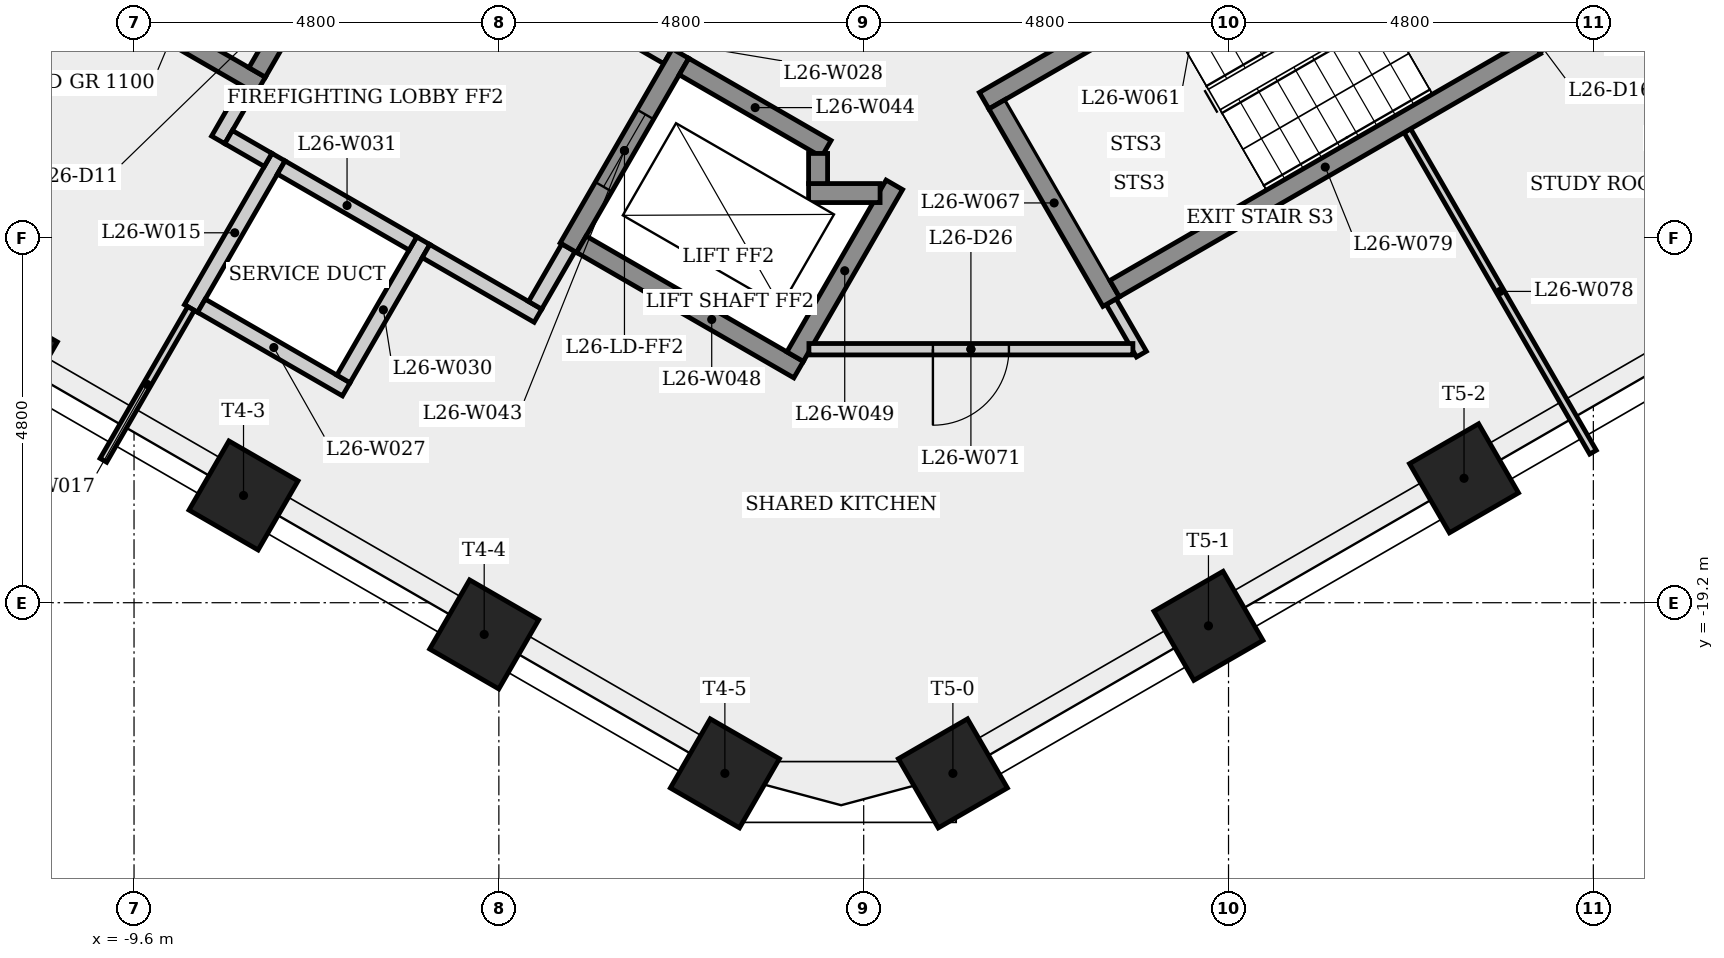
"""IFC4 building model, lengths in metres.
Left out: names, types, materials, properties, quantities, classifications, styles, units other than length and angle.
Written with IfcOpenShell. Run it as: python <this file> out.ifc"""

import sys

from ifc_helpers import new_model, si_unit, direction, frame, frame_2d, origin, origin_2d, place, context, subcontext, project, spatial, rectangle, extrude, element, fill, save


model = new_model("IFC4")
c1 = context("Model", 3, precision=1e-05, world=origin(), true_north=direction((0.0, 1.0)))
c2 = subcontext(c1, "Body", "Model", "MODEL_VIEW")
j1 = project(units=[si_unit("LENGTHUNIT", "METRE"), si_unit("PLANEANGLEUNIT", "RADIAN")], contexts=[c1])
p1 = place(None, origin())
s1 = spatial("IfcSite", under=j1, at=p1, CompositionType="ELEMENT")
p2 = place(p1, origin())
s2 = spatial("IfcBuilding", under=s1, at=p2, CompositionType="ELEMENT")
p3 = place(p2, frame((0.0, 0.0, 100.1)))
s3 = spatial("IfcBuildingStorey", under=s2, at=p3, CompositionType="ELEMENT", Elevation=100.1)
for number, where, z_axis, x_axis in (
    (1, (-11.326, -15.961, 0.0), (0.0, 0.0, 1.0), (-0.5, -0.866, 0.0)),
    (2, (-8.159, -17.789, 0.0), (0.0, 0.0, 1.0), (-0.5, -0.866, 0.0)),
    (3, (-4.993, -19.617, 0.0), (0.0, 0.0, 1.0), (-0.5, -0.866, 0.0)),
    (4, (-1.826, -21.446, 0.0), (0.0, 0.0, 1.0), (-0.5, -0.866, 0.0)),
    (5, (1.174, -21.446, 0.0), (0.0, 0.0, 1.0), (0.5, -0.866, 0.0)),
    (6, (4.536, -19.504, 0.0), (0.0, 0.0, 1.0), (0.5, -0.866, 0.0)),
    (7, (7.898, -17.563, 0.0), (0.0, 0.0, 1.0), (0.5, -0.866, 0.0)),
):
    element("IfcColumn", number, at=place(p3, frame(where, z_axis=z_axis, x_axis=x_axis)), inside=s3, PredefinedType="COLUMN", context=c2, shape_type="SweptSolid", body=[
        extrude(rectangle(XDim=1.05, YDim=1.05, at=origin_2d()), origin(), (0.0, 0.0, 1.0), 3.4),
    ])
p4 = place(p3, frame((-8.85, -15.329, 0.0), z_axis=(0.0, 0.0, 1.0), x_axis=(0.500077740698, 0.865980515519, 0.0)))
e8 = element("IfcWall", 8, at=p4, inside=s3, PredefinedType="PLUMBINGWALL", context=c2, shape_type="SweptSolid", body=[
    extrude(rectangle(XDim=2.3, YDim=0.2, at=frame_2d((1.15, 0.0))), origin(), (0.0, 0.0, 1.0), 3.05),
])
p5 = place(p3, frame((-8.85, -15.329, 0.0), z_axis=(0.0, 0.0, 1.0), x_axis=(-0.500009533716, -0.866019899421, 0.0)))
e9 = element("IfcWall", 9, at=p5, inside=s3, PredefinedType="PARTITIONING", context=c2, shape_type="SweptSolid", body=[
    extrude(rectangle(XDim=2.307, YDim=0.1, at=frame_2d((1.153, 0.0))), origin(), (0.0, 0.0, 1.0), 3.05),
])
p6 = place(p3, frame((-8.493, -13.11, 0.0), z_axis=(0.0, 0.0, 1.0), x_axis=(0.500067724834, 0.865986299303, 0.0)))
e10 = element("IfcWall", 10, at=p6, inside=s3, PredefinedType="PARTITIONING", context=c2, shape_type="SweptSolid", body=[
    extrude(rectangle(XDim=0.775, YDim=0.2, at=frame_2d((0.388, 0.0))), origin(), (0.0, 0.0, 1.0), 3.05),
])
p7 = place(p3, frame((-7.935, -12.393, 0.0), z_axis=(0.0, 0.0, 1.0), x_axis=(-0.866025499775, 0.499999833739, 0.0)))
e11 = element("IfcWall", 11, at=p7, inside=s3, PredefinedType="SHEAR", context=c2, shape_type="SweptSolid", body=[
    extrude(rectangle(XDim=6.4, YDim=0.25, at=frame_2d((3.2, 0.0))), origin(), (0.0, 0.0, 1.0), 3.05),
])
p8 = place(p3, frame((-7.836, -13.373, 0.0), z_axis=(0.0, 0.0, 1.0), x_axis=(-0.866232998003, 0.499640263761, 0.0)))
e12 = element("IfcWall", 12, at=p8, inside=s3, PredefinedType="PARTITIONING", context=c2, shape_type="SweptSolid", body=[
    extrude(rectangle(XDim=0.6, YDim=0.2, at=frame_2d((0.3, 0.0))), origin(), (0.0, 0.0, 1.0), 3.05),
])
p9 = place(p3, frame((-6.808, -16.392, 0.0), z_axis=(0.0, 0.0, 1.0), x_axis=(-0.866008176907, 0.50002983664, 0.0)))
e13 = element("IfcWall", 13, at=p9, inside=s3, PredefinedType="PLUMBINGWALL", context=c2, shape_type="SweptSolid", body=[
    extrude(rectangle(XDim=2.2, YDim=0.2, at=frame_2d((1.1, 0.0))), origin(), (0.0, 0.0, 1.0), 3.05),
])
p10 = place(p3, frame((-6.605, -9.841, 0.0), z_axis=(0.0, 0.0, 1.0), x_axis=(-0.499996545922, -0.866027397988, 0.0)))
e14 = element("IfcWall", 14, at=p10, inside=s3, PredefinedType="SHEAR", context=c2, shape_type="SweptSolid", body=[
    extrude(rectangle(XDim=2.75, YDim=0.25, at=frame_2d((1.375, 0.0))), origin(), (0.0, 0.0, 1.0), 3.05),
])
p11 = place(p10, frame((0.875, 0.0, 0.0)))
e15 = element("IfcOpeningElement", 15, at=p11, cuts=e14, PredefinedType="OPENING", context=c2, shape_type="SweptSolid", body=[
    extrude(rectangle(XDim=1.0, YDim=2.1, at=frame_2d((0.5, 1.05))), frame((0.0, 0.135, 0.0), z_axis=(0.0, -1.0, 0.0), x_axis=(1.0, 0.0, 0.0)), (0.0, 0.0, 1.0), 0.27),
])
p12 = place(p3, frame((-6.435, -9.795, 0.0), z_axis=(0.0, 0.0, 1.0), x_axis=(0.866012907634, -0.500021643343, 0.0)))
e16 = element("IfcWall", 16, at=p12, inside=s3, PredefinedType="PARTITIONING", context=c2, shape_type="SweptSolid", body=[
    extrude(rectangle(XDim=4.45, YDim=0.2, at=frame_2d((2.225, 0.0))), origin(), (0.0, 0.0, 1.0), 3.05),
])
p13 = place(p12, frame((1.675, 0.0, 0.0)))
e17 = element("IfcOpeningElement", 17, at=p13, cuts=e16, PredefinedType="OPENING", context=c2, shape_type="SweptSolid", body=[
    extrude(rectangle(XDim=1.1, YDim=2.1, at=frame_2d((0.55, 1.05))), frame((0.0, 0.11, 0.0), z_axis=(0.0, -1.0, 0.0), x_axis=(1.0, 0.0, 0.0)), (0.0, 0.0, 1.0), 0.22),
])
p14 = place(p3, frame((-5.795, -14.437, 0.0), z_axis=(0.0, 0.0, 1.0), x_axis=(-0.500027713859, -0.866009402589, 0.0)))
e18 = element("IfcWall", 18, at=p14, inside=s3, PredefinedType="PLUMBINGWALL", context=c2, shape_type="SweptSolid", body=[
    extrude(rectangle(XDim=2.1, YDim=0.2, at=frame_2d((1.05, 0.0))), origin(), (0.0, 0.0, 1.0), 3.05),
])
p15 = place(p3, frame((-5.931, -14.473, 0.0), z_axis=(0.0, 0.0, 1.0), x_axis=(-0.866041268327, 0.499972520799, 0.0)))
e19 = element("IfcWall", 19, at=p15, inside=s3, PredefinedType="PLUMBINGWALL", context=c2, shape_type="SweptSolid", body=[
    extrude(rectangle(XDim=2.0, YDim=0.2, at=frame_2d((1.0, 0.0))), origin(), (0.0, 0.0, 1.0), 3.05),
])
p16 = place(p3, frame((-4.286, -15.423, 0.0), z_axis=(0.0, 0.0, 1.0), x_axis=(-0.866025371046, 0.500000056704, 0.0)))
e20 = element("IfcWall", 20, at=p16, inside=s3, PredefinedType="PARTITIONING", context=c2, shape_type="SweptSolid", body=[
    extrude(rectangle(XDim=1.7, YDim=0.2, at=frame_2d((0.85, 0.0))), origin(), (0.0, 0.0, 1.0), 3.05),
])
p17 = place(p3, frame((-3.885, -14.529, 0.0), z_axis=(0.0, 0.0, 1.0), x_axis=(-0.499859285417, -0.866106630146, 0.0)))
e21 = element("IfcWall", 21, at=p17, inside=s3, PredefinedType="PARTITIONING", context=c2, shape_type="SweptSolid", body=[
    extrude(rectangle(XDim=0.875, YDim=0.2, at=frame_2d((0.438, 0.0))), origin(), (0.0, 0.0, 1.0), 3.05),
])
p18 = place(p3, frame((-2.41, -11.974, 0.0), z_axis=(0.0, 0.0, 1.0), x_axis=(-0.500001826776, -0.866024349092, 0.0)))
e22 = element("IfcWall", 22, at=p18, inside=s3, PredefinedType="SHEAR", context=c2, shape_type="SweptSolid", body=[
    extrude(rectangle(XDim=2.95, YDim=0.25, at=frame_2d((1.475, 0.0))), origin(), (0.0, 0.0, 1.0), 3.05),
])
p19 = place(p18, frame((0.925, 0.0, 0.0)))
e23 = element("IfcOpeningElement", 23, at=p19, cuts=e22, PredefinedType="OPENING", context=c2, shape_type="SweptSolid", body=[
    extrude(rectangle(XDim=1.1, YDim=2.1, at=frame_2d((0.55, 1.05))), frame((0.0, 0.135, 0.0), z_axis=(0.0, -1.0, 0.0), x_axis=(1.0, 0.0, 0.0)), (0.0, 0.0, 1.0), 0.27),
])
p20 = place(p3, frame((-2.364, -12.145, 0.0), z_axis=(0.0, 0.0, 1.0), x_axis=(0.86603892542, -0.499976579108, 0.0)))
e24 = element("IfcWall", 24, at=p20, inside=s3, PredefinedType="SHEAR", context=c2, shape_type="SweptSolid", body=[
    extrude(rectangle(XDim=2.162, YDim=0.25, at=frame_2d((1.081, 0.0))), origin(), (0.0, 0.0, 1.0), 3.05),
])
p21 = place(p3, frame((-0.856, -16.133, 0.0), z_axis=(0.0, 0.0, 1.0), x_axis=(-0.866021716278, 0.500006386895, 0.0)))
e25 = element("IfcWall", 25, at=p21, inside=s3, PredefinedType="SHEAR", context=c2, shape_type="SweptSolid", body=[
    extrude(rectangle(XDim=3.3, YDim=0.25, at=frame_2d((1.65, 0.0))), origin(), (0.0, 0.0, 1.0), 3.05),
])
p22 = place(p3, frame((-0.902, -15.962, 0.0), z_axis=(0.0, 0.0, 1.0), x_axis=(0.499981517636, 0.866036074319, 0.0)))
e26 = element("IfcWall", 26, at=p22, inside=s3, PredefinedType="SHEAR", context=c2, shape_type="SweptSolid", body=[
    extrude(rectangle(XDim=2.61, YDim=0.25, at=frame_2d((1.305, 0.0))), origin(), (0.0, 0.0, 1.0), 3.05),
])
p23 = place(p3, frame((-0.725, -13.81, 0.0), z_axis=(0.0, 0.0, 1.0), x_axis=(1.0, 0.0, 0.0)))
e27 = element("IfcWall", 27, at=p23, inside=s3, PredefinedType="SHEAR", context=c2, shape_type="SweptSolid", body=[
    extrude(rectangle(XDim=0.941, YDim=0.25, at=frame_2d((0.47, 0.0))), origin(), (0.0, 0.0, 1.0), 3.4),
])
p24 = place(p3, frame((-0.6, -13.289, 0.0), z_axis=(0.0, 0.0, 1.0), x_axis=(0.0, -1.0, 0.0)))
e28 = element("IfcWall", 28, at=p24, inside=s3, PredefinedType="SHEAR", context=c2, shape_type="SweptSolid", body=[
    extrude(rectangle(XDim=0.396, YDim=0.25, at=frame_2d((0.198, 0.0))), origin(), (0.0, 0.0, 1.0), 3.4),
])
p25 = place(p3, frame((1.585, -12.595, 0.0), z_axis=(0.0, 0.0, 1.0), x_axis=(0.866036417653, 0.499980922934, 0.0)))
e29 = element("IfcWall", 29, at=p25, inside=s3, PredefinedType="SHEAR", context=c2, shape_type="SweptSolid", body=[
    extrude(rectangle(XDim=6.65, YDim=0.25, at=frame_2d((3.325, 0.0))), origin(), (0.0, 0.0, 1.0), 3.05),
])
p26 = place(p25, frame((5.275, 0.0, 0.0)))
e30 = element("IfcOpeningElement", 30, at=p26, cuts=e29, PredefinedType="OPENING", context=c2, shape_type="SweptSolid", body=[
    extrude(rectangle(XDim=1.0, YDim=2.1, at=frame_2d((0.5, 1.05))), frame((0.0, 0.135, 0.0), z_axis=(0.0, -1.0, 0.0), x_axis=(1.0, 0.0, 0.0)), (0.0, 0.0, 1.0), 0.27),
])
p27 = place(p3, frame((3.256, -15.239, 0.0), z_axis=(0.0, 0.0, 1.0), x_axis=(0.499925626596, -0.866068339032, 0.0)))
e31 = element("IfcWall", 31, at=p27, inside=s3, PredefinedType="PARTITIONING", context=c2, shape_type="SweptSolid", body=[
    extrude(rectangle(XDim=0.797, YDim=0.15, at=frame_2d((0.399, 0.0))), origin(), (0.0, 0.0, 1.0), 3.05),
])
p28 = place(p3, frame((3.256, -15.239, 0.0), z_axis=(0.0, 0.0, 1.0), x_axis=(-0.50002537861, 0.866010750942, 0.0)))
e32 = element("IfcWall", 32, at=p28, inside=s3, PredefinedType="SHEAR", context=c2, shape_type="SweptSolid", body=[
    extrude(rectangle(XDim=3.0, YDim=0.25, at=frame_2d((1.5, 0.0))), origin(), (0.0, 0.0, 1.0), 3.05),
])
p29 = place(p3, frame((3.542, -15.865, 0.0), z_axis=(0.0, 0.0, 1.0), x_axis=(-1.0, 0.0, 0.0)))
e33 = element("IfcWall", 33, at=p29, inside=s3, PredefinedType="PARTITIONING", context=c2, shape_type="SweptSolid", body=[
    extrude(rectangle(XDim=4.263, YDim=0.15, at=frame_2d((2.131, 0.0))), origin(), (0.0, 0.0, 1.0), 3.05),
])
p30 = place(p29, frame((1.631, 0.0, 0.0)))
e34 = element("IfcOpeningElement", 34, at=p30, cuts=e33, PredefinedType="OPENING", context=c2, shape_type="SweptSolid", body=[
    extrude(rectangle(XDim=1.0, YDim=2.1, at=frame_2d((0.5, 1.05))), frame((0.0, 0.085, 0.0), z_axis=(0.0, -1.0, 0.0), x_axis=(1.0, 0.0, 0.0)), (0.0, 0.0, 1.0), 0.17),
])
p31 = place(p3, frame((7.153, -12.989, 0.0), z_axis=(0.0, 0.0, 1.0), x_axis=(0.500025283505, -0.866010805854, 0.0)))
e35 = element("IfcWall", 35, at=p31, inside=s3, PredefinedType="PARTITIONING", context=c2, shape_type="SweptSolid", body=[
    extrude(rectangle(XDim=4.885, YDim=0.1, at=frame_2d((2.442, 0.0))), origin(), (0.0, 0.0, 1.0), 3.05),
])
p32 = place(p3, frame((3.301, -15.068, 0.0), z_axis=(0.0, 0.0, 1.0), x_axis=(0.866035036182, 0.499983315828, 0.0)))
e36 = element("IfcWall", 36, at=p32, inside=s3, PredefinedType="SHEAR", context=c2, shape_type="SweptSolid", body=[
    extrude(rectangle(XDim=6.4, YDim=0.25, at=frame_2d((3.2, 0.0))), origin(), (0.0, 0.0, 1.0), 3.05),
])
p33 = place(p3, frame((10.901, -10.681, 0.0), z_axis=(0.0, 0.0, 1.0), x_axis=(-0.866007538022, -0.500030943131, 0.0)))
e37 = element("IfcWall", 37, at=p33, inside=s3, PredefinedType="PARTITIONING", context=c2, shape_type="SweptSolid", body=[
    extrude(rectangle(XDim=2.375, YDim=0.2, at=frame_2d((1.188, 0.0))), origin(), (0.0, 0.0, 1.0), 3.05),
])
p34 = place(p19, origin())
e38 = element("IfcDoor", 38, at=p34, inside=s3, OperationType="SLIDING_TO_LEFT", PredefinedType="DOOR", context=c2, shape_type="SweptSolid", body=[
    extrude(rectangle(XDim=1.1, YDim=2.1, at=frame_2d((0.55, 1.05))), frame((0.0, 0.025, 0.0), z_axis=(0.0, -1.0, 0.0), x_axis=(1.0, 0.0, 0.0)), (0.0, 0.0, 1.0), 0.05),
])
fill(e23, e38)
p35 = place(p30, origin())
e39 = element("IfcDoor", 39, at=p35, inside=s3, OperationType="SINGLE_SWING_RIGHT", PredefinedType="DOOR", context=c2, shape_type="SweptSolid", body=[
    extrude(rectangle(XDim=1.0, YDim=2.1, at=frame_2d((0.5, 1.05))), frame((0.0, 0.025, 0.0), z_axis=(0.0, -1.0, 0.0), x_axis=(1.0, 0.0, 0.0)), (0.0, 0.0, 1.0), 0.05),
])
fill(e34, e39)
save(model, sys.argv[1])
